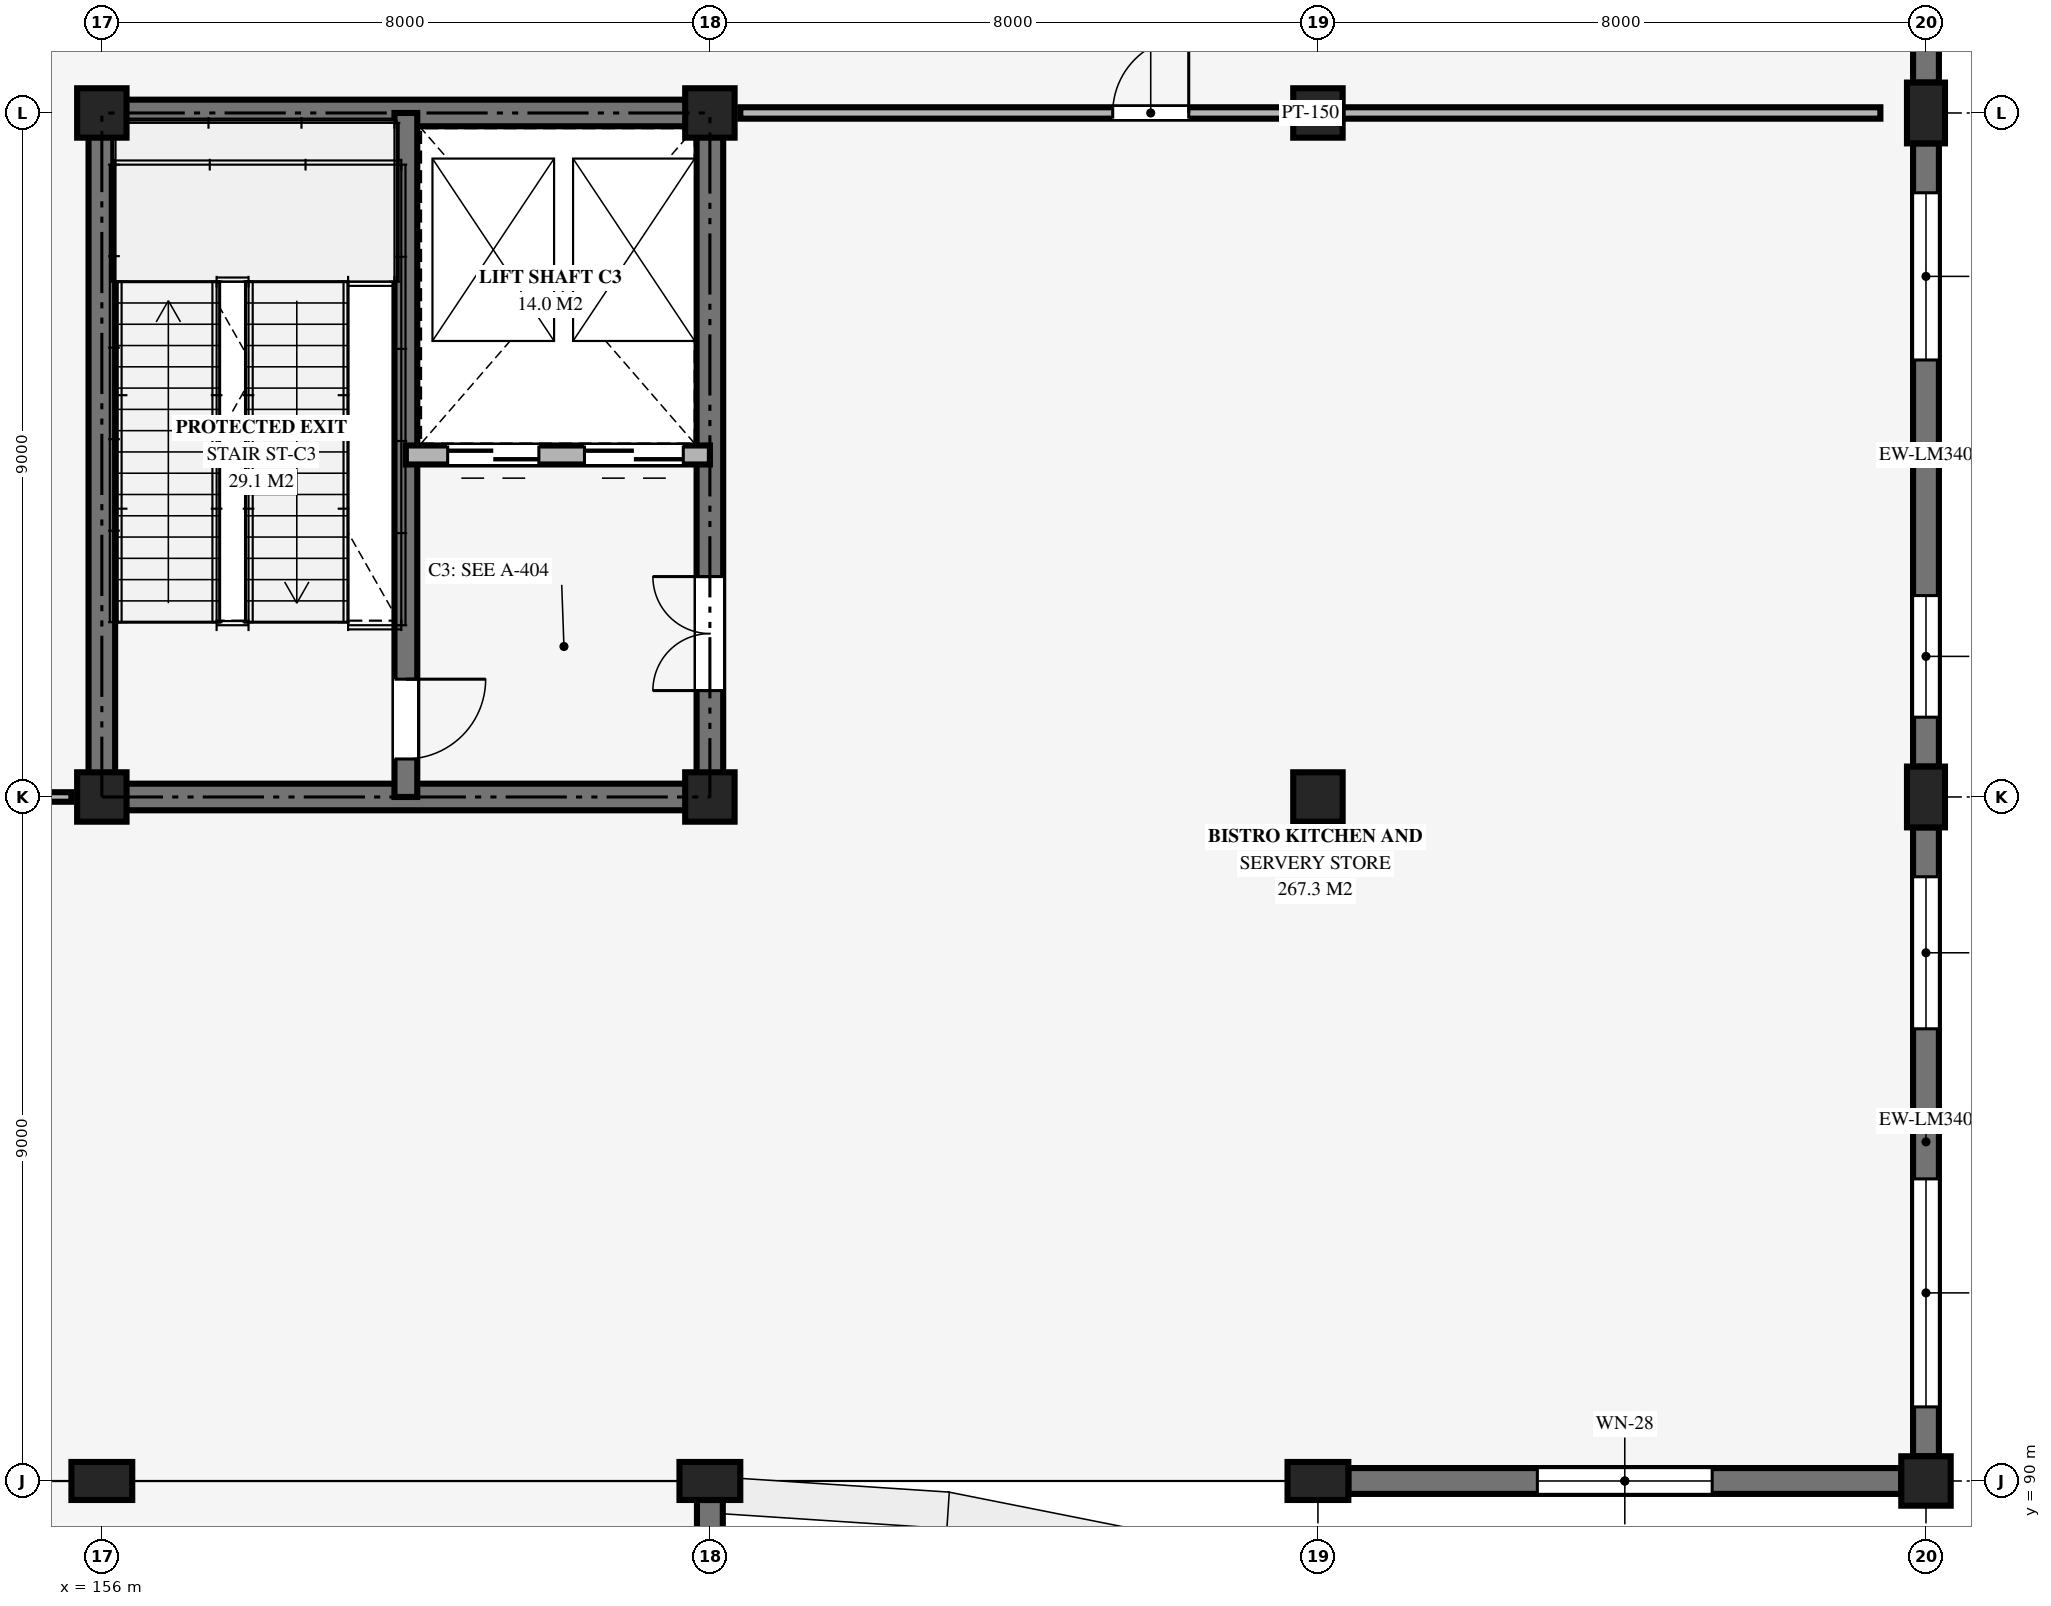
"""IFC4 building model, lengths in metres.
Left out: names, types, materials, properties, quantities, classifications, styles, units other than length and angle.
Written with IfcOpenShell. Run it as: python <this file> out.ifc"""

import sys

from ifc_helpers import new_model, si_unit, direction, frame, frame_2d, origin, origin_2d, place, context, subcontext, project, spatial, rectangle, extrude, element, fill, save


model = new_model("IFC4")
c1 = context("Model", 3, precision=1e-05, world=origin(), true_north=direction((0.0, 1.0)))
c2 = subcontext(c1, "Body", "Model", "MODEL_VIEW")
j1 = project(units=[si_unit("LENGTHUNIT", "METRE"), si_unit("PLANEANGLEUNIT", "RADIAN")], contexts=[c1])
p1 = place(None, origin())
s1 = spatial("IfcSite", under=j1, at=p1, CompositionType="ELEMENT")
p2 = place(p1, origin())
s2 = spatial("IfcBuilding", under=s1, at=p2, CompositionType="ELEMENT")
p3 = place(p2, frame((0.0, 0.0, 10.2)))
s3 = spatial("IfcBuildingStorey", under=s2, at=p3, CompositionType="ELEMENT", Elevation=10.2)
p4 = place(p3, frame((156.0, 90.0, 0.0), z_axis=(0.0, 0.0, 1.0), x_axis=(0.0, 1.0, 0.0)))
e1 = element("IfcColumn", 1, at=p4, inside=s3, PredefinedType="PILASTER", context=c2, shape_type="SweptSolid", body=[
    extrude(rectangle(XDim=0.5, YDim=0.8, at=origin_2d()), origin(), (0.0, 0.0, 1.0), 4.64),
])
for number, where, z_axis, x_axis in (
    (2, (156.0, 99.0, 0.0), (0.0, 0.0, 1.0), (1.0, 0.0, 0.0)),
    (3, (156.0, 108.0, 0.0), (0.0, 0.0, 1.0), (1.0, 0.0, 0.0)),
):
    element("IfcColumn", number, at=place(p3, frame(where, z_axis=z_axis, x_axis=x_axis)), inside=s3, PredefinedType="COLUMN", context=c2, shape_type="SweptSolid", body=[
        extrude(rectangle(XDim=0.65, YDim=0.65, at=origin_2d()), origin(), (0.0, 0.0, 1.0), 4.64),
    ])
p5 = place(p3, frame((164.0, 90.0, 0.0), z_axis=(0.0, 0.0, 1.0), x_axis=(0.0, 1.0, 0.0)))
e4 = element("IfcColumn", 4, at=p5, inside=s3, PredefinedType="PILASTER", context=c2, shape_type="SweptSolid", body=[
    extrude(rectangle(XDim=0.5, YDim=0.8, at=origin_2d()), origin(), (0.0, 0.0, 1.0), 4.64),
])
for number, where, z_axis, x_axis in (
    (5, (164.0, 99.0, 0.0), (0.0, 0.0, 1.0), (1.0, 0.0, 0.0)),
    (6, (164.0, 108.0, 0.0), (0.0, 0.0, 1.0), (1.0, 0.0, 0.0)),
):
    element("IfcColumn", number, at=place(p3, frame(where, z_axis=z_axis, x_axis=x_axis)), inside=s3, PredefinedType="COLUMN", context=c2, shape_type="SweptSolid", body=[
        extrude(rectangle(XDim=0.65, YDim=0.65, at=origin_2d()), origin(), (0.0, 0.0, 1.0), 4.64),
    ])
p6 = place(p3, frame((172.0, 90.0, 0.0), z_axis=(0.0, 0.0, 1.0), x_axis=(0.0, 1.0, 0.0)))
e7 = element("IfcColumn", 7, at=p6, inside=s3, PredefinedType="PILASTER", context=c2, shape_type="SweptSolid", body=[
    extrude(rectangle(XDim=0.5, YDim=0.8, at=origin_2d()), origin(), (0.0, 0.0, 1.0), 4.64),
])
for number, where, z_axis, x_axis in (
    (8, (172.0, 99.0, 0.0), (0.0, 0.0, 1.0), (1.0, 0.0, 0.0)),
    (9, (172.0, 108.0, 0.0), (0.0, 0.0, 1.0), (1.0, 0.0, 0.0)),
    (10, (180.0, 90.0, 0.0), (0.0, 0.0, 1.0), (1.0, 0.0, 0.0)),
):
    element("IfcColumn", number, at=place(p3, frame(where, z_axis=z_axis, x_axis=x_axis)), inside=s3, PredefinedType="COLUMN", context=c2, shape_type="SweptSolid", body=[
        extrude(rectangle(XDim=0.65, YDim=0.65, at=origin_2d()), origin(), (0.0, 0.0, 1.0), 4.64),
    ])
for number, where, z_axis, x_axis in (
    (11, (180.0, 99.0, 0.0), (0.0, 0.0, 1.0), (1.0, 0.0, 0.0)),
    (12, (180.0, 108.0, 0.0), (0.0, 0.0, 1.0), (1.0, 0.0, 0.0)),
):
    element("IfcColumn", number, at=place(p3, frame(where, z_axis=z_axis, x_axis=x_axis)), inside=s3, PredefinedType="PILASTER", context=c2, shape_type="SweptSolid", body=[
        extrude(rectangle(XDim=0.5, YDim=0.8, at=origin_2d()), origin(), (0.0, 0.0, 1.0), 4.64),
    ])
p7 = place(p3, frame((164.0, 88.65, 0.0), z_axis=(0.0, 0.0, 1.0), x_axis=(0.0, 1.0, 0.0)))
e13 = element("IfcWall", 13, at=p7, inside=s3, PredefinedType="SOLIDWALL", context=c2, shape_type="SweptSolid", body=[
    extrude(rectangle(XDim=1.1, YDim=0.34, at=frame_2d((0.55, 0.0))), origin(), (0.0, 0.0, 1.0), 4.52),
])
p8 = place(p3, frame((180.0, 90.325, 0.0), z_axis=(0.0, 0.0, 1.0), x_axis=(0.0, 1.0, 0.0)))
e14 = element("IfcWall", 14, at=p8, inside=s3, PredefinedType="SOLIDWALL", context=c2, shape_type="SweptSolid", body=[
    extrude(rectangle(XDim=8.275, YDim=0.34, at=frame_2d((4.138, 0.0))), origin(), (0.0, 0.0, 1.0), 4.52),
])
p9 = place(p8, frame((0.65, 0.0, 0.95)))
e15 = element("IfcOpeningElement", 15, at=p9, cuts=e14, PredefinedType="OPENING", context=c2, shape_type="SweptSolid", body=[
    extrude(rectangle(XDim=3.0, YDim=1.4, at=frame_2d((1.5, 0.7))), frame((0.0, 0.18, 0.0), z_axis=(0.0, -1.0, 0.0), x_axis=(1.0, 0.0, 0.0)), (0.0, 0.0, 1.0), 0.36),
])
p10 = place(p8, frame((5.625, 0.0, 0.95)))
e16 = element("IfcOpeningElement", 16, at=p10, cuts=e14, PredefinedType="OPENING", context=c2, shape_type="SweptSolid", body=[
    extrude(rectangle(XDim=2.0, YDim=1.2, at=frame_2d((1.0, 0.6))), frame((0.0, 0.18, 0.0), z_axis=(0.0, -1.0, 0.0), x_axis=(1.0, 0.0, 0.0)), (0.0, 0.0, 1.0), 0.36),
])
p11 = place(p3, frame((180.0, 99.4, 0.0), z_axis=(0.0, 0.0, 1.0), x_axis=(0.0, 1.0, 0.0)))
e17 = element("IfcWall", 17, at=p11, inside=s3, PredefinedType="SOLIDWALL", context=c2, shape_type="SweptSolid", body=[
    extrude(rectangle(XDim=8.2, YDim=0.34, at=frame_2d((4.1, 0.0))), origin(), (0.0, 0.0, 1.0), 4.52),
])
p12 = place(p11, frame((0.65, 0.0, 0.95)))
e18 = element("IfcOpeningElement", 18, at=p12, cuts=e17, PredefinedType="OPENING", context=c2, shape_type="SweptSolid", body=[
    extrude(rectangle(XDim=1.6, YDim=2.0, at=frame_2d((0.8, 1.0))), frame((0.0, 0.18, 0.0), z_axis=(0.0, -1.0, 0.0), x_axis=(1.0, 0.0, 0.0)), (0.0, 0.0, 1.0), 0.36),
])
p13 = place(p11, frame((5.35, 0.0, 0.95)))
e19 = element("IfcOpeningElement", 19, at=p13, cuts=e17, PredefinedType="OPENING", context=c2, shape_type="SweptSolid", body=[
    extrude(rectangle(XDim=2.2, YDim=1.9, at=frame_2d((1.1, 0.95))), frame((0.0, 0.18, 0.0), z_axis=(0.0, -1.0, 0.0), x_axis=(1.0, 0.0, 0.0)), (0.0, 0.0, 1.0), 0.36),
])
p14 = place(p3, frame((180.0, 108.4, 0.0), z_axis=(0.0, 0.0, 1.0), x_axis=(0.0, 1.0, 0.0)))
e20 = element("IfcWall", 20, at=p14, inside=s3, PredefinedType="SOLIDWALL", context=c2, shape_type="SweptSolid", body=[
    extrude(rectangle(XDim=8.2, YDim=0.34, at=frame_2d((4.1, 0.0))), origin(), (0.0, 0.0, 1.0), 4.52),
])
p15 = place(p14, frame((0.65, 0.0, 0.95)))
e21 = element("IfcOpeningElement", 21, at=p15, cuts=e20, PredefinedType="OPENING", context=c2, shape_type="SweptSolid", body=[
    extrude(rectangle(XDim=1.9, YDim=1.9, at=frame_2d((0.95, 0.95))), frame((0.0, 0.18, 0.0), z_axis=(0.0, -1.0, 0.0), x_axis=(1.0, 0.0, 0.0)), (0.0, 0.0, 1.0), 0.36),
])
p16 = place(p14, frame((5.85, 0.0, 0.95)))
e22 = element("IfcOpeningElement", 22, at=p16, cuts=e20, PredefinedType="OPENING", context=c2, shape_type="SweptSolid", body=[
    extrude(rectangle(XDim=1.7, YDim=1.7, at=frame_2d((0.85, 0.85))), frame((0.0, 0.18, 0.0), z_axis=(0.0, -1.0, 0.0), x_axis=(1.0, 0.0, 0.0)), (0.0, 0.0, 1.0), 0.36),
])
p17 = place(p3, frame((179.675, 90.0, 0.0), z_axis=(0.0, 0.0, 1.0), x_axis=(-1.0, 0.0, 0.0)))
e23 = element("IfcWall", 23, at=p17, inside=s3, PredefinedType="SOLIDWALL", context=c2, shape_type="SweptSolid", body=[
    extrude(rectangle(XDim=7.275, YDim=0.34, at=frame_2d((3.638, 0.0))), origin(), (0.0, 0.0, 1.0), 4.52),
])
p18 = place(p17, frame((2.488, 0.0, 1.0)))
e24 = element("IfcOpeningElement", 24, at=p18, cuts=e23, PredefinedType="OPENING", context=c2, shape_type="SweptSolid", body=[
    extrude(rectangle(XDim=2.3, YDim=1.5, at=frame_2d((1.15, 0.75))), frame((0.0, 0.18, 0.0), z_axis=(0.0, -1.0, 0.0), x_axis=(1.0, 0.0, 0.0)), (0.0, 0.0, 1.0), 0.36),
])
for number, where, z_axis, x_axis in (
    (25, (156.0, 99.0, 0.0), (0.0, 0.0, 1.0), (1.0, 0.0, 0.0)),
    (26, (156.0, 108.0, 0.0), (0.0, 0.0, 1.0), (1.0, 0.0, 0.0)),
):
    element("IfcWall", number, at=place(p3, frame(where, z_axis=z_axis, x_axis=x_axis)), inside=s3, PredefinedType="SHEAR", context=c2, shape_type="SweptSolid", body=[
        extrude(rectangle(XDim=8.0, YDim=0.35, at=frame_2d((4.0, 0.0))), origin(), (0.0, 0.0, 1.0), 4.78),
    ])
p19 = place(p3, frame((156.0, 99.0, 0.0), z_axis=(0.0, 0.0, 1.0), x_axis=(0.0, 1.0, 0.0)))
e27 = element("IfcWall", 27, at=p19, inside=s3, PredefinedType="SHEAR", context=c2, shape_type="SweptSolid", body=[
    extrude(rectangle(XDim=9.0, YDim=0.35, at=frame_2d((4.5, 0.0))), origin(), (0.0, 0.0, 1.0), 4.78),
])
p20 = place(p3, frame((164.0, 99.0, 0.0), z_axis=(0.0, 0.0, 1.0), x_axis=(0.0, 1.0, 0.0)))
e28 = element("IfcWall", 28, at=p20, inside=s3, PredefinedType="SHEAR", context=c2, shape_type="SweptSolid", body=[
    extrude(rectangle(XDim=9.0, YDim=0.35, at=frame_2d((4.5, 0.0))), origin(), (0.0, 0.0, 1.0), 4.78),
])
p21 = place(p20, frame((1.4, 0.0, 0.0)))
e29 = element("IfcOpeningElement", 29, at=p21, cuts=e28, PredefinedType="OPENING", context=c2, shape_type="SweptSolid", body=[
    extrude(rectangle(XDim=1.5, YDim=2.2, at=frame_2d((0.75, 1.1))), frame((0.0, 0.185, 0.0), z_axis=(0.0, -1.0, 0.0), x_axis=(1.0, 0.0, 0.0)), (0.0, 0.0, 1.0), 0.37),
])
p22 = place(p3, frame((160.0, 108.0, 0.0), z_axis=(0.0, 0.0, 1.0), x_axis=(0.0, -1.0, 0.0)))
e30 = element("IfcWall", 30, at=p22, inside=s3, PredefinedType="SHEAR", context=c2, shape_type="SweptSolid", body=[
    extrude(rectangle(XDim=9.0, YDim=0.3, at=frame_2d((4.5, 0.0))), origin(), (0.0, 0.0, 1.0), 4.78),
])
p23 = place(p22, frame((7.45, 0.0, 0.0)))
e31 = element("IfcOpeningElement", 31, at=p23, cuts=e30, PredefinedType="OPENING", context=c2, shape_type="SweptSolid", body=[
    extrude(rectangle(XDim=1.05, YDim=2.15, at=frame_2d((0.525, 1.075))), frame((0.0, 0.16, 0.0), z_axis=(0.0, -1.0, 0.0), x_axis=(1.0, 0.0, 0.0)), (0.0, 0.0, 1.0), 0.32),
])
p24 = place(p3, frame((164.0, 103.5, 0.0), z_axis=(0.0, 0.0, 1.0), x_axis=(-1.0, 0.0, 0.0)))
e32 = element("IfcWall", 32, at=p24, inside=s3, PredefinedType="SOLIDWALL", context=c2, shape_type="SweptSolid", body=[
    extrude(rectangle(XDim=4.0, YDim=0.25, at=frame_2d((2.0, 0.0))), origin(), (0.0, 0.0, 1.0), 3.65),
])
p25 = place(p24, frame((0.35, 0.0, 0.0)))
e33 = element("IfcOpeningElement", 33, at=p25, cuts=e32, PredefinedType="OPENING", context=c2, shape_type="SweptSolid", body=[
    extrude(rectangle(XDim=1.3, YDim=2.25, at=frame_2d((0.65, 1.125))), frame((0.0, 0.135, 0.0), z_axis=(0.0, -1.0, 0.0), x_axis=(1.0, 0.0, 0.0)), (0.0, 0.0, 1.0), 0.27),
])
p26 = place(p24, frame((2.25, 0.0, 0.0)))
e34 = element("IfcOpeningElement", 34, at=p26, cuts=e32, PredefinedType="OPENING", context=c2, shape_type="SweptSolid", body=[
    extrude(rectangle(XDim=1.2, YDim=2.2, at=frame_2d((0.6, 1.1))), frame((0.0, 0.135, 0.0), z_axis=(0.0, -1.0, 0.0), x_axis=(1.0, 0.0, 0.0)), (0.0, 0.0, 1.0), 0.27),
])
p27 = place(p3, frame((164.4, 108.0, 0.0), z_axis=(0.0, 0.0, 1.0), x_axis=(1.0, 0.0, 0.0)))
e35 = element("IfcWall", 35, at=p27, inside=s3, PredefinedType="PARTITIONING", context=c2, shape_type="SweptSolid", body=[
    extrude(rectangle(XDim=15.0, YDim=0.15, at=frame_2d((7.5, 0.0))), origin(), (0.0, 0.0, 1.0), 3.65),
])
p28 = place(p27, frame((4.9, 0.0, 0.0)))
e36 = element("IfcOpeningElement", 36, at=p28, cuts=e35, PredefinedType="OPENING", context=c2, shape_type="SweptSolid", body=[
    extrude(rectangle(XDim=1.0, YDim=2.15, at=frame_2d((0.5, 1.075))), frame((0.0, 0.085, 0.0), z_axis=(0.0, -1.0, 0.0), x_axis=(1.0, 0.0, 0.0)), (0.0, 0.0, 1.0), 0.17),
])
p29 = place(p3, frame((132.4, 99.0, 0.0), z_axis=(0.0, 0.0, 1.0), x_axis=(1.0, 0.0, 0.0)))
e37 = element("IfcWall", 37, at=p29, inside=s3, PredefinedType="PARTITIONING", context=c2, shape_type="SweptSolid", body=[
    extrude(rectangle(XDim=23.2, YDim=0.125, at=frame_2d((11.6, 0.0))), origin(), (0.0, 0.0, 1.0), 3.65),
])
p30 = place(p29, frame((11.0, 0.0, 0.0)))
e38 = element("IfcOpeningElement", 38, at=p30, cuts=e37, PredefinedType="OPENING", context=c2, shape_type="SweptSolid", body=[
    extrude(rectangle(XDim=1.35, YDim=2.15, at=frame_2d((0.675, 1.075))), frame((0.0, 0.073, 0.0), z_axis=(0.0, -1.0, 0.0), x_axis=(1.0, 0.0, 0.0)), (0.0, 0.0, 1.0), 0.145),
])
p31 = place(p9, origin())
e39 = element("IfcWindow", 39, at=p31, inside=s3, PartitioningType="SINGLE_PANEL", PredefinedType="WINDOW", context=c2, shape_type="SweptSolid", body=[
    extrude(rectangle(XDim=3.0, YDim=1.4, at=frame_2d((1.5, 0.7))), frame((0.0, 0.03, 0.0), z_axis=(0.0, -1.0, 0.0), x_axis=(1.0, 0.0, 0.0)), (0.0, 0.0, 1.0), 0.06),
])
fill(e15, e39)
p32 = place(p10, origin())
e40 = element("IfcWindow", 40, at=p32, inside=s3, PartitioningType="SINGLE_PANEL", PredefinedType="WINDOW", context=c2, shape_type="SweptSolid", body=[
    extrude(rectangle(XDim=2.0, YDim=1.2, at=frame_2d((1.0, 0.6))), frame((0.0, 0.03, 0.0), z_axis=(0.0, -1.0, 0.0), x_axis=(1.0, 0.0, 0.0)), (0.0, 0.0, 1.0), 0.06),
])
fill(e16, e40)
p33 = place(p12, origin())
e41 = element("IfcWindow", 41, at=p33, inside=s3, PartitioningType="SINGLE_PANEL", PredefinedType="WINDOW", context=c2, shape_type="SweptSolid", body=[
    extrude(rectangle(XDim=1.6, YDim=2.0, at=frame_2d((0.8, 1.0))), frame((0.0, 0.03, 0.0), z_axis=(0.0, -1.0, 0.0), x_axis=(1.0, 0.0, 0.0)), (0.0, 0.0, 1.0), 0.06),
])
fill(e18, e41)
p34 = place(p13, origin())
e42 = element("IfcWindow", 42, at=p34, inside=s3, PartitioningType="SINGLE_PANEL", PredefinedType="WINDOW", context=c2, shape_type="SweptSolid", body=[
    extrude(rectangle(XDim=2.2, YDim=1.9, at=frame_2d((1.1, 0.95))), frame((0.0, 0.03, 0.0), z_axis=(0.0, -1.0, 0.0), x_axis=(1.0, 0.0, 0.0)), (0.0, 0.0, 1.0), 0.06),
])
fill(e19, e42)
p35 = place(p18, origin())
e43 = element("IfcWindow", 43, at=p35, inside=s3, PartitioningType="SINGLE_PANEL", PredefinedType="WINDOW", context=c2, shape_type="SweptSolid", body=[
    extrude(rectangle(XDim=2.3, YDim=1.5, at=frame_2d((1.15, 0.75))), frame((0.0, 0.03, 0.0), z_axis=(0.0, -1.0, 0.0), x_axis=(1.0, 0.0, 0.0)), (0.0, 0.0, 1.0), 0.06),
])
fill(e24, e43)
p36 = place(p25, origin())
e44 = element("IfcDoor", 44, at=p36, inside=s3, OperationType="DOUBLE_DOOR_SLIDING", PredefinedType="USERDEFINED", context=c2, shape_type="SweptSolid", body=[
    extrude(rectangle(XDim=1.3, YDim=2.25, at=frame_2d((0.65, 1.125))), frame((0.0, 0.025, 0.0), z_axis=(0.0, -1.0, 0.0), x_axis=(1.0, 0.0, 0.0)), (0.0, 0.0, 1.0), 0.05),
])
fill(e33, e44)
p37 = place(p26, origin())
e45 = element("IfcDoor", 45, at=p37, inside=s3, OperationType="DOUBLE_DOOR_SLIDING", PredefinedType="USERDEFINED", context=c2, shape_type="SweptSolid", body=[
    extrude(rectangle(XDim=1.2, YDim=2.2, at=frame_2d((0.6, 1.1))), frame((0.0, 0.025, 0.0), z_axis=(0.0, -1.0, 0.0), x_axis=(1.0, 0.0, 0.0)), (0.0, 0.0, 1.0), 0.05),
])
fill(e34, e45)
p38 = place(p23, origin())
e46 = element("IfcDoor", 46, at=p38, inside=s3, OperationType="SINGLE_SWING_LEFT", PredefinedType="DOOR", context=c2, shape_type="SweptSolid", body=[
    extrude(rectangle(XDim=1.05, YDim=2.15, at=frame_2d((0.525, 1.075))), frame((0.0, 0.025, 0.0), z_axis=(0.0, -1.0, 0.0), x_axis=(1.0, 0.0, 0.0)), (0.0, 0.0, 1.0), 0.05),
])
fill(e31, e46)
p39 = place(p21, origin())
e47 = element("IfcDoor", 47, at=p39, inside=s3, OperationType="DOUBLE_DOOR_SINGLE_SWING", PredefinedType="DOOR", context=c2, shape_type="SweptSolid", body=[
    extrude(rectangle(XDim=1.5, YDim=2.2, at=frame_2d((0.75, 1.1))), frame((0.0, 0.025, 0.0), z_axis=(0.0, -1.0, 0.0), x_axis=(1.0, 0.0, 0.0)), (0.0, 0.0, 1.0), 0.05),
])
fill(e29, e47)
p40 = place(p28, origin())
e48 = element("IfcDoor", 48, at=p40, inside=s3, OperationType="SINGLE_SWING_RIGHT", PredefinedType="DOOR", context=c2, shape_type="SweptSolid", body=[
    extrude(rectangle(XDim=1.0, YDim=2.15, at=frame_2d((0.5, 1.075))), frame((0.0, 0.025, 0.0), z_axis=(0.0, -1.0, 0.0), x_axis=(1.0, 0.0, 0.0)), (0.0, 0.0, 1.0), 0.05),
])
fill(e36, e48)
save(model, sys.argv[1])
